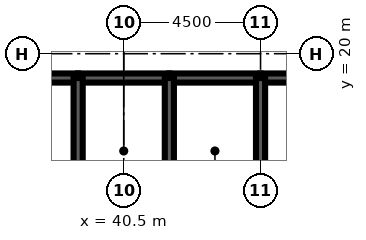
"""IFC4 building model, lengths in metres.
Left out: names, types, materials, properties, quantities, classifications, styles, units other than length and angle.
Written with IfcOpenShell. Run it as: python <this file> out.ifc"""

import sys

from ifc_helpers import new_model, si_unit, direction, frame, frame_2d, origin, place, context, subcontext, project, spatial, rectangle, extrude, element, fill, save


model = new_model("IFC4")
c1 = context("Model", 3, precision=1e-05, world=origin(), true_north=direction((0.0, 1.0)))
c2 = subcontext(c1, "Body", "Model", "MODEL_VIEW")
j1 = project(units=[si_unit("LENGTHUNIT", "METRE"), si_unit("PLANEANGLEUNIT", "RADIAN")], contexts=[c1])
p1 = place(None, origin())
s1 = spatial("IfcSite", under=j1, at=p1, CompositionType="ELEMENT")
p2 = place(p1, origin())
s2 = spatial("IfcBuilding", under=s1, at=p2, CompositionType="ELEMENT")
p3 = place(p2, frame((0.0, 0.0, 227.8)))
s3 = spatial("IfcBuildingStorey", under=s2, at=p3, CompositionType="ELEMENT", Elevation=227.8)
p4 = place(p3, frame((36.0, 19.2, 0.0), z_axis=(0.0, 0.0, 1.0), x_axis=(1.0, 0.0, 0.0)))
e1 = element("IfcWall", 1, at=p4, inside=s3, PredefinedType="SOLIDWALL", context=c2, shape_type="SweptSolid", body=[
    extrude(rectangle(XDim=3.0, YDim=0.3, at=frame_2d((1.5, 0.0))), origin(), (0.0, 0.0, 1.0), 4.2),
])
p5 = place(p4, frame((0.95, 0.0, 0.0)))
e2 = element("IfcOpeningElement", 2, at=p5, cuts=e1, PredefinedType="OPENING", context=c2, shape_type="SweptSolid", body=[
    extrude(rectangle(XDim=1.1, YDim=2.2, at=frame_2d((0.55, 1.1))), frame((0.0, 0.16, 0.0), z_axis=(0.0, -1.0, 0.0), x_axis=(1.0, 0.0, 0.0)), (0.0, 0.0, 1.0), 0.32),
])
p6 = place(p3, frame((39.0, 19.2, 0.0), z_axis=(0.0, 0.0, 1.0), x_axis=(1.0, 0.0, 0.0)))
e3 = element("IfcWall", 3, at=p6, inside=s3, PredefinedType="SOLIDWALL", context=c2, shape_type="SweptSolid", body=[
    extrude(rectangle(XDim=3.0, YDim=0.3, at=frame_2d((1.5, 0.0))), origin(), (0.0, 0.0, 1.0), 4.2),
])
p7 = place(p6, frame((1.0, 0.0, 0.0)))
e4 = element("IfcOpeningElement", 4, at=p7, cuts=e3, PredefinedType="OPENING", context=c2, shape_type="SweptSolid", body=[
    extrude(rectangle(XDim=1.0, YDim=2.1, at=frame_2d((0.5, 1.05))), frame((0.0, 0.16, 0.0), z_axis=(0.0, -1.0, 0.0), x_axis=(1.0, 0.0, 0.0)), (0.0, 0.0, 1.0), 0.32),
])
p8 = place(p3, frame((42.0, 19.2, 0.0), z_axis=(0.0, 0.0, 1.0), x_axis=(1.0, 0.0, 0.0)))
e5 = element("IfcWall", 5, at=p8, inside=s3, PredefinedType="SOLIDWALL", context=c2, shape_type="SweptSolid", body=[
    extrude(rectangle(XDim=3.0, YDim=0.3, at=frame_2d((1.5, 0.0))), origin(), (0.0, 0.0, 1.0), 4.2),
])
p9 = place(p8, frame((1.0, 0.0, 0.0)))
e6 = element("IfcOpeningElement", 6, at=p9, cuts=e5, PredefinedType="OPENING", context=c2, shape_type="SweptSolid", body=[
    extrude(rectangle(XDim=1.0, YDim=2.1, at=frame_2d((0.5, 1.05))), frame((0.0, 0.16, 0.0), z_axis=(0.0, -1.0, 0.0), x_axis=(1.0, 0.0, 0.0)), (0.0, 0.0, 1.0), 0.32),
])
p10 = place(p3, frame((45.0, 19.2, 0.0), z_axis=(0.0, 0.0, 1.0), x_axis=(1.0, 0.0, 0.0)))
e7 = element("IfcWall", 7, at=p10, inside=s3, PredefinedType="SOLIDWALL", context=c2, shape_type="SweptSolid", body=[
    extrude(rectangle(XDim=9.0, YDim=0.3, at=frame_2d((4.5, 0.0))), origin(), (0.0, 0.0, 1.0), 4.2),
])
p11 = place(p10, frame((7.35, 0.0, 0.0)))
e8 = element("IfcOpeningElement", 8, at=p11, cuts=e7, PredefinedType="OPENING", context=c2, shape_type="SweptSolid", body=[
    extrude(rectangle(XDim=1.0, YDim=2.1, at=frame_2d((0.5, 1.05))), frame((0.0, 0.16, 0.0), z_axis=(0.0, -1.0, 0.0), x_axis=(1.0, 0.0, 0.0)), (0.0, 0.0, 1.0), 0.32),
])
for number, where, z_axis, x_axis in (
    (9, (39.0, 16.0, 0.0), (0.0, 0.0, 1.0), (0.0, 1.0, 0.0)),
    (10, (42.0, 16.0, 0.0), (0.0, 0.0, 1.0), (0.0, 1.0, 0.0)),
    (11, (45.0, 16.0, 0.0), (0.0, 0.0, 1.0), (0.0, 1.0, 0.0)),
):
    element("IfcWall", number, at=place(p3, frame(where, z_axis=z_axis, x_axis=x_axis)), inside=s3, PredefinedType="SOLIDWALL", context=c2, shape_type="SweptSolid", body=[
        extrude(rectangle(XDim=3.2, YDim=0.3, at=frame_2d((1.6, 0.0))), origin(), (0.0, 0.0, 1.0), 4.2),
    ])
p12 = place(p3, frame((39.15, 17.35, 0.0), z_axis=(0.0, 0.0, 1.0), x_axis=(1.0, 0.0, 0.0)))
e12 = element("IfcWall", 12, at=p12, inside=s3, PredefinedType="SOLIDWALL", context=c2, shape_type="SweptSolid", body=[
    extrude(rectangle(XDim=2.7, YDim=0.3, at=frame_2d((1.35, 0.0))), origin(), (0.0, 0.0, 1.0), 4.04),
])
p13 = place(p12, frame((0.85, 0.0, 0.0)))
e13 = element("IfcOpeningElement", 13, at=p13, cuts=e12, PredefinedType="OPENING", context=c2, shape_type="SweptSolid", body=[
    extrude(rectangle(XDim=1.0, YDim=2.1, at=frame_2d((0.5, 1.05))), frame((0.0, 0.16, 0.0), z_axis=(0.0, -1.0, 0.0), x_axis=(1.0, 0.0, 0.0)), (0.0, 0.0, 1.0), 0.32),
])
p14 = place(p3, frame((42.15, 17.35, 0.0), z_axis=(0.0, 0.0, 1.0), x_axis=(1.0, 0.0, 0.0)))
e14 = element("IfcWall", 14, at=p14, inside=s3, PredefinedType="SOLIDWALL", context=c2, shape_type="SweptSolid", body=[
    extrude(rectangle(XDim=2.7, YDim=0.3, at=frame_2d((1.35, 0.0))), origin(), (0.0, 0.0, 1.0), 4.04),
])
p15 = place(p14, frame((0.85, 0.0, 0.0)))
e15 = element("IfcOpeningElement", 15, at=p15, cuts=e14, PredefinedType="OPENING", context=c2, shape_type="SweptSolid", body=[
    extrude(rectangle(XDim=1.0, YDim=2.1, at=frame_2d((0.5, 1.05))), frame((0.0, 0.16, 0.0), z_axis=(0.0, -1.0, 0.0), x_axis=(1.0, 0.0, 0.0)), (0.0, 0.0, 1.0), 0.32),
])
p16 = place(p13, origin())
e16 = element("IfcDoor", 16, at=p16, inside=s3, OperationType="SINGLE_SWING_LEFT", PredefinedType="DOOR", context=c2, shape_type="SweptSolid", body=[
    extrude(rectangle(XDim=1.0, YDim=2.1, at=frame_2d((0.5, 1.05))), frame((0.0, 0.025, 0.0), z_axis=(0.0, -1.0, 0.0), x_axis=(1.0, 0.0, 0.0)), (0.0, 0.0, 1.0), 0.05),
])
fill(e13, e16)
p17 = place(p15, origin())
e17 = element("IfcDoor", 17, at=p17, inside=s3, OperationType="SINGLE_SWING_LEFT", PredefinedType="DOOR", context=c2, shape_type="SweptSolid", body=[
    extrude(rectangle(XDim=1.0, YDim=2.1, at=frame_2d((0.5, 1.05))), frame((0.0, 0.025, 0.0), z_axis=(0.0, -1.0, 0.0), x_axis=(1.0, 0.0, 0.0)), (0.0, 0.0, 1.0), 0.05),
])
fill(e15, e17)
p18 = place(p7, origin())
e18 = element("IfcDoor", 18, at=p18, inside=s3, OperationType="SINGLE_SWING_LEFT", PredefinedType="DOOR", context=c2, shape_type="SweptSolid", body=[
    extrude(rectangle(XDim=1.0, YDim=2.1, at=frame_2d((0.5, 1.05))), frame((0.0, 0.025, 0.0), z_axis=(0.0, -1.0, 0.0), x_axis=(1.0, 0.0, 0.0)), (0.0, 0.0, 1.0), 0.05),
])
fill(e4, e18)
p19 = place(p9, origin())
e19 = element("IfcDoor", 19, at=p19, inside=s3, OperationType="SINGLE_SWING_LEFT", PredefinedType="DOOR", context=c2, shape_type="SweptSolid", body=[
    extrude(rectangle(XDim=1.0, YDim=2.1, at=frame_2d((0.5, 1.05))), frame((0.0, 0.025, 0.0), z_axis=(0.0, -1.0, 0.0), x_axis=(1.0, 0.0, 0.0)), (0.0, 0.0, 1.0), 0.05),
])
fill(e6, e19)
save(model, sys.argv[1])
